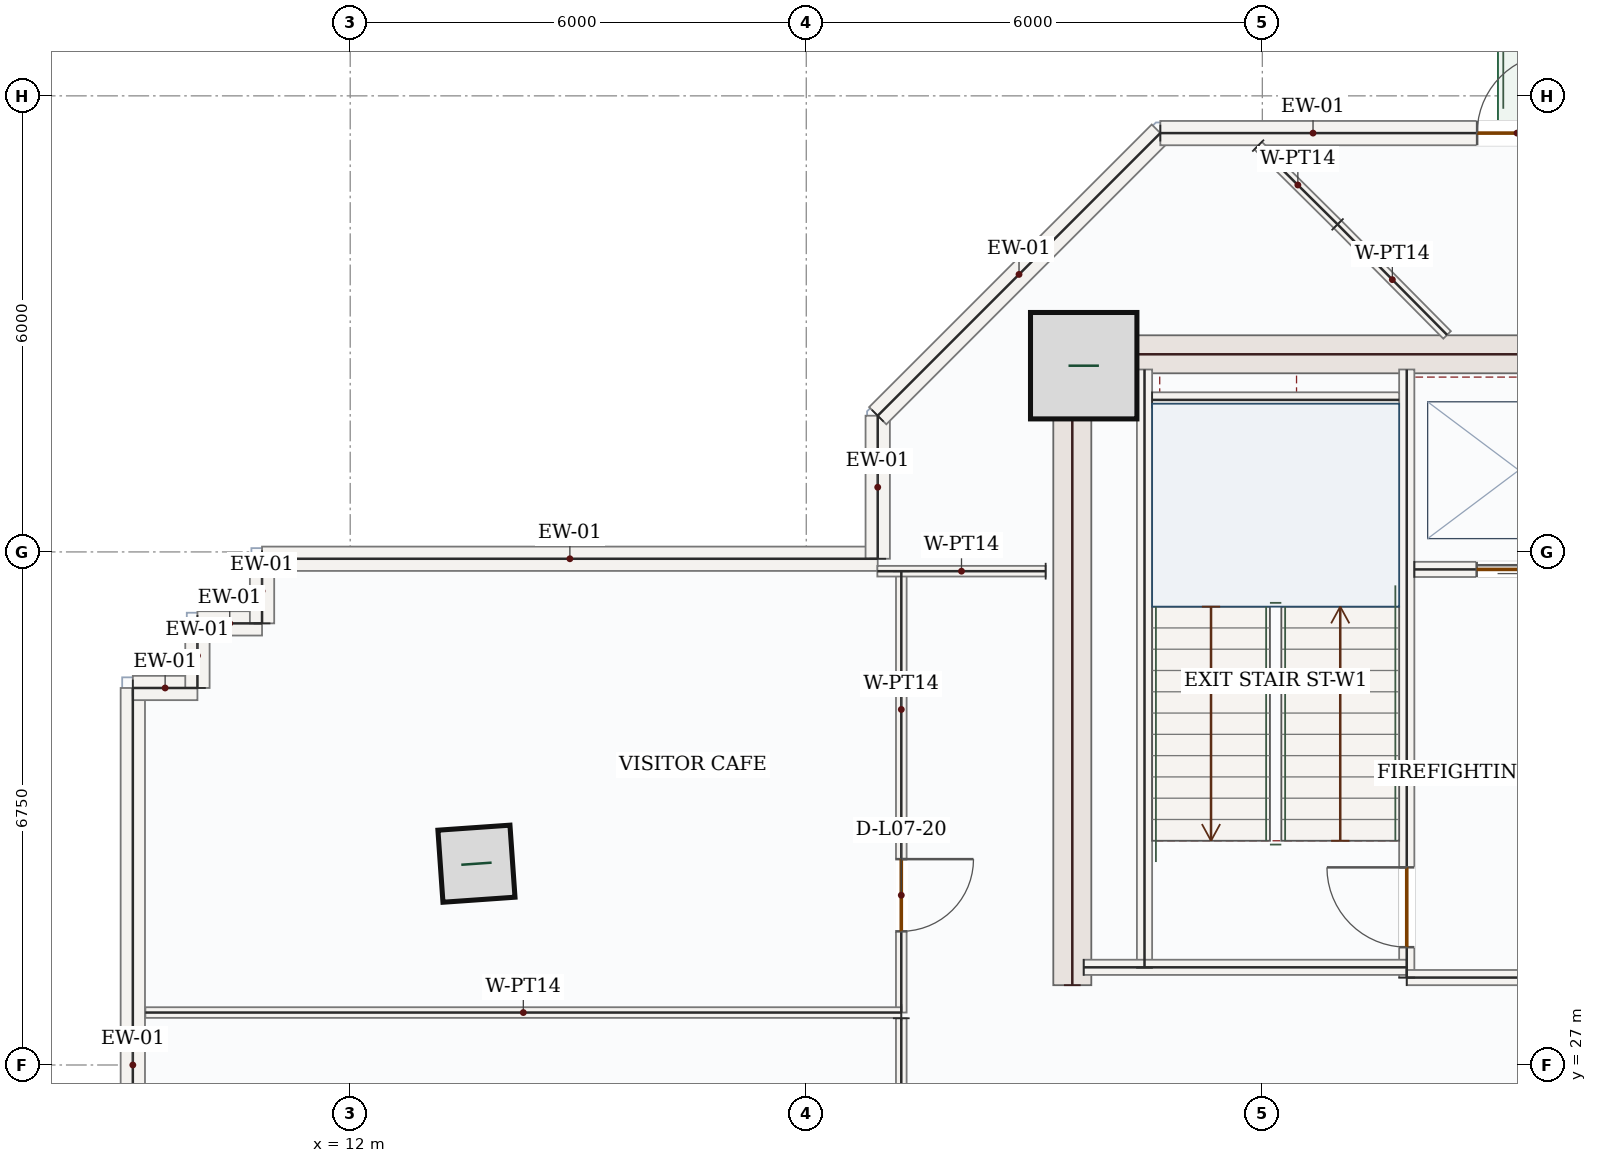
"""IFC4 building model, lengths in metres.
Left out: names, types, materials, properties, quantities, classifications, styles, units other than length and angle.
Written with IfcOpenShell. Run it as: python <this file> out.ifc"""

import sys

from ifc_helpers import new_model, si_unit, direction, frame, frame_2d, origin, origin_2d, place, context, subcontext, project, spatial, rectangle, hollow_rectangle, extrude, source, transform, mapped, element, fill, save


model = new_model("IFC4")
c1 = context("Model", 3, precision=1e-05, world=origin(), true_north=direction((0.0, 1.0)))
c2 = subcontext(c1, "Body", "Model", "MODEL_VIEW")
j1 = project(units=[si_unit("LENGTHUNIT", "METRE"), si_unit("PLANEANGLEUNIT", "RADIAN")], contexts=[c1])
p1 = place(None, origin())
s1 = spatial("IfcSite", under=j1, at=p1, CompositionType="ELEMENT")
p2 = place(p1, origin())
s2 = spatial("IfcBuilding", under=s1, at=p2, CompositionType="ELEMENT")
p3 = place(p2, frame((0.0, 0.0, 37.5)))
s3 = spatial("IfcBuildingStorey", under=s2, at=p3, CompositionType="ELEMENT", Elevation=37.5)
m1 = source(origin(), c2, "Body", "SweptSolid", [
    extrude(rectangle(XDim=8.55, YDim=0.5, at=frame_2d((4.275, 0.0))), origin(), (0.0, 0.0, 1.0), 3.95),
])
p4 = place(p3, frame((21.5, 28.05, 0.0), z_axis=(0.0, 0.0, 1.0), x_axis=(0.0, 1.0, 0.0)))
e1 = element("IfcWall", 1, at=p4, inside=s3, PredefinedType="SHEAR", context=c2, shape_type="MappedRepresentation", body=[
    mapped(m1, transform((0.0, 0.0, 0.0), x_axis=(1.0, 0.0, 0.0), y_axis=(0.0, 1.0, 0.0), z_axis=(0.0, 0.0, 1.0), scale=1.0)),
])
m2 = source(origin(), c2, "Body", "SweptSolid", [
    extrude(rectangle(XDim=7.0, YDim=0.5, at=frame_2d((3.5, 0.0))), origin(), (0.0, 0.0, 1.0), 3.95),
])
p5 = place(p3, frame((21.75, 36.35, 0.0), z_axis=(0.0, 0.0, 1.0), x_axis=(1.0, 0.0, 0.0)))
e2 = element("IfcWall", 2, at=p5, inside=s3, PredefinedType="SHEAR", context=c2, shape_type="MappedRepresentation", body=[
    mapped(m2, transform((0.0, 0.0, 0.0), x_axis=(1.0, 0.0, 0.0), y_axis=(0.0, 1.0, 0.0), z_axis=(0.0, 0.0, 1.0), scale=1.0)),
])
m3 = source(origin(), c2, "Body", "SweptSolid", [
    extrude(rectangle(XDim=1.4, YDim=1.4, at=origin_2d()), origin(), (0.0, 0.0, 1.0), 4.2),
])
p6 = place(p3, frame((21.65, 36.2, 0.0), z_axis=(0.0, 0.0, 1.0), x_axis=(1.0, 0.0, 0.0)))
e3 = element("IfcColumn", 3, at=p6, inside=s3, PredefinedType="COLUMN", context=c2, shape_type="MappedRepresentation", body=[
    mapped(m3, transform((0.0, 0.0, 0.0), x_axis=(1.0, 0.0, 0.0), y_axis=(0.0, 1.0, 0.0), z_axis=(0.0, 0.0, 1.0), scale=1.0)),
])
m4 = source(origin(), c2, "Body", "SweptSolid", [
    extrude(hollow_rectangle(XDim=0.95, YDim=0.95, WallThickness=0.05, at=origin_2d()), origin(), (0.0, 0.0, 1.0), 4.2),
])
p7 = place(p3, frame((13.661, 29.648, 0.0), z_axis=(0.0, 0.0, 1.0), x_axis=(0.99756405026, 0.069756473744, 0.0)))
e4 = element("IfcColumn", 4, at=p7, inside=s3, PredefinedType="COLUMN", context=c2, shape_type="MappedRepresentation", body=[
    mapped(m4, transform((0.0, 0.0, 0.0), x_axis=(1.0, 0.0, 0.0), y_axis=(0.0, 1.0, 0.0), z_axis=(0.0, 0.0, 1.0), scale=1.0)),
])
m5 = source(origin(), c2, "Body", "SweptSolid", [
    extrude(rectangle(XDim=9.92, YDim=0.32, at=frame_2d((4.96, 0.0))), origin(), (0.0, 0.0, 1.0), 3.95),
])
p8 = place(p3, frame((9.14, 22.04, 0.0), z_axis=(0.0, 0.0, 1.0), x_axis=(0.0, 1.0, 0.0)))
e5 = element("IfcWall", 5, at=p8, inside=s3, PredefinedType="SOLIDWALL", context=c2, shape_type="MappedRepresentation", body=[
    mapped(m5, transform((0.0, 0.0, 0.0), x_axis=(1.0, 0.0, 0.0), y_axis=(0.0, 1.0, 0.0), z_axis=(0.0, 0.0, 1.0), scale=1.0)),
])
m6 = source(origin(), c2, "Body", "SweptSolid", [
    extrude(rectangle(XDim=0.85, YDim=0.32, at=frame_2d((0.425, 0.0))), origin(), (0.0, 0.0, 1.0), 3.95),
])
for number, where, z_axis, x_axis in (
    (6, (9.14, 31.96, 0.0), (0.0, 0.0, 1.0), (1.0, 0.0, 0.0)),
    (7, (9.99, 31.96, 0.0), (0.0, 0.0, 1.0), (0.0, 1.0, 0.0)),
    (8, (9.99, 32.81, 0.0), (0.0, 0.0, 1.0), (1.0, 0.0, 0.0)),
):
    element("IfcWall", number, at=place(p3, frame(where, z_axis=z_axis, x_axis=x_axis)), inside=s3, PredefinedType="SOLIDWALL", context=c2, shape_type="MappedRepresentation", body=[
        mapped(m6, transform((0.0, 0.0, 0.0), x_axis=(1.0, 0.0, 0.0), y_axis=(0.0, 1.0, 0.0), z_axis=(0.0, 0.0, 1.0), scale=1.0)),
    ])
m7 = source(origin(), c2, "Body", "SweptSolid", [
    extrude(rectangle(XDim=0.85, YDim=0.32, at=frame_2d((0.425, 0.0))), origin(), (0.0, 0.0, 1.0), 3.95),
])
p9 = place(p3, frame((10.84, 32.81, 0.0), z_axis=(0.0, 0.0, 1.0), x_axis=(0.0, 1.0, 0.0)))
e9 = element("IfcWall", 9, at=p9, inside=s3, PredefinedType="SOLIDWALL", context=c2, shape_type="MappedRepresentation", body=[
    mapped(m7, transform((0.0, 0.0, 0.0), x_axis=(1.0, 0.0, 0.0), y_axis=(0.0, 1.0, 0.0), z_axis=(0.0, 0.0, 1.0), scale=1.0)),
])
m8 = source(origin(), c2, "Body", "SweptSolid", [
    extrude(rectangle(XDim=8.1, YDim=0.32, at=frame_2d((4.05, 0.0))), origin(), (0.0, 0.0, 1.0), 3.95),
])
p10 = place(p3, frame((10.84, 33.66, 0.0), z_axis=(0.0, 0.0, 1.0), x_axis=(1.0, 0.0, 0.0)))
e10 = element("IfcWall", 10, at=p10, inside=s3, PredefinedType="SOLIDWALL", context=c2, shape_type="MappedRepresentation", body=[
    mapped(m8, transform((0.0, 0.0, 0.0), x_axis=(1.0, 0.0, 0.0), y_axis=(0.0, 1.0, 0.0), z_axis=(0.0, 0.0, 1.0), scale=1.0)),
])
m9 = source(origin(), c2, "Body", "SweptSolid", [
    extrude(rectangle(XDim=1.882, YDim=0.32, at=frame_2d((0.941, 0.0))), origin(), (0.0, 0.0, 1.0), 3.95),
])
p11 = place(p3, frame((18.94, 33.66, 0.0), z_axis=(0.0, 0.0, 1.0), x_axis=(0.0, 1.0, 0.0)))
e11 = element("IfcWall", 11, at=p11, inside=s3, PredefinedType="SOLIDWALL", context=c2, shape_type="MappedRepresentation", body=[
    mapped(m9, transform((0.0, 0.0, 0.0), x_axis=(1.0, 0.0, 0.0), y_axis=(0.0, 1.0, 0.0), z_axis=(0.0, 0.0, 1.0), scale=1.0)),
])
m10 = source(origin(), c2, "Body", "SweptSolid", [
    extrude(rectangle(XDim=5.258, YDim=0.32, at=frame_2d((2.629, 0.0))), origin(), (0.0, 0.0, 1.0), 3.95),
])
p12 = place(p3, frame((18.94, 35.542, 0.0), z_axis=(0.0, 0.0, 1.0), x_axis=(0.707106781187, 0.707106781187, 0.0)))
e12 = element("IfcWall", 12, at=p12, inside=s3, PredefinedType="SOLIDWALL", context=c2, shape_type="MappedRepresentation", body=[
    mapped(m10, transform((0.0, 0.0, 0.0), x_axis=(1.0, 0.0, 0.0), y_axis=(0.0, 1.0, 0.0), z_axis=(0.0, 0.0, 1.0), scale=1.0)),
])
p13 = place(p3, frame((22.658, 39.26, 0.0), z_axis=(0.0, 0.0, 1.0), x_axis=(1.0, 0.0, 0.0)))
e13 = element("IfcWall", 13, at=p13, inside=s3, PredefinedType="SOLIDWALL", context=c2, shape_type="SweptSolid", body=[
    extrude(rectangle(XDim=6.682, YDim=0.32, at=frame_2d((3.341, 0.0))), origin(), (0.0, 0.0, 1.0), 3.95),
])
p14 = place(p13, frame((4.168, 0.0, 0.0)))
e14 = element("IfcOpeningElement", 14, at=p14, cuts=e13, PredefinedType="OPENING", context=c2, shape_type="SweptSolid", body=[
    extrude(rectangle(XDim=1.05, YDim=2.15, at=frame_2d((0.525, 1.075))), frame((0.0, 0.17, 0.0), z_axis=(0.0, -1.0, 0.0), x_axis=(1.0, 0.0, 0.0)), (0.0, 0.0, 1.0), 0.34),
])
m11 = source(origin(), c2, "Body", "SweptSolid", [
    extrude(rectangle(XDim=7.87, YDim=0.2, at=frame_2d((3.935, 0.0))), origin(), (0.0, 0.0, 1.0), 3.95),
])
p15 = place(p3, frame((22.45, 28.28, 0.0), z_axis=(0.0, 0.0, 1.0), x_axis=(0.0, 1.0, 0.0)))
e15 = element("IfcWall", 15, at=p15, inside=s3, PredefinedType="SOLIDWALL", context=c2, shape_type="MappedRepresentation", body=[
    mapped(m11, transform((0.0, 0.0, 0.0), x_axis=(1.0, 0.0, 0.0), y_axis=(0.0, 1.0, 0.0), z_axis=(0.0, 0.0, 1.0), scale=1.0)),
])
p16 = place(p3, frame((25.9, 28.15, 0.0), z_axis=(0.0, 0.0, 1.0), x_axis=(0.0, 1.0, 0.0)))
e16 = element("IfcWall", 16, at=p16, inside=s3, PredefinedType="SOLIDWALL", context=c2, shape_type="SweptSolid", body=[
    extrude(rectangle(XDim=8.0, YDim=0.2, at=frame_2d((4.0, 0.0))), origin(), (0.0, 0.0, 1.0), 3.95),
])
p17 = place(p16, frame((0.4, 0.0, 0.0)))
e17 = element("IfcOpeningElement", 17, at=p17, cuts=e16, PredefinedType="OPENING", context=c2, shape_type="SweptSolid", body=[
    extrude(rectangle(XDim=1.05, YDim=2.15, at=frame_2d((0.525, 1.075))), frame((0.0, 0.11, 0.0), z_axis=(0.0, -1.0, 0.0), x_axis=(1.0, 0.0, 0.0)), (0.0, 0.0, 1.0), 0.22),
])
m12 = source(origin(), c2, "Body", "SweptSolid", [
    extrude(rectangle(XDim=4.25, YDim=0.2, at=frame_2d((2.125, 0.0))), origin(), (0.0, 0.0, 1.0), 3.95),
])
p18 = place(p3, frame((21.65, 28.285, 0.0), z_axis=(0.0, 0.0, 1.0), x_axis=(1.0, 0.0, 0.0)))
e18 = element("IfcWall", 18, at=p18, inside=s3, PredefinedType="SOLIDWALL", context=c2, shape_type="MappedRepresentation", body=[
    mapped(m12, transform((0.0, 0.0, 0.0), x_axis=(1.0, 0.0, 0.0), y_axis=(0.0, 1.0, 0.0), z_axis=(0.0, 0.0, 1.0), scale=1.0)),
])
m13 = source(origin(), c2, "Body", "SweptSolid", [
    extrude(rectangle(XDim=3.0, YDim=0.2, at=frame_2d((1.5, 0.0))), origin(), (0.0, 0.0, 1.0), 3.95),
])
p19 = place(p3, frame((25.9, 28.15, 0.0), z_axis=(0.0, 0.0, 1.0), x_axis=(1.0, 0.0, 0.0)))
e19 = element("IfcWall", 19, at=p19, inside=s3, PredefinedType="SOLIDWALL", context=c2, shape_type="MappedRepresentation", body=[
    mapped(m13, transform((0.0, 0.0, 0.0), x_axis=(1.0, 0.0, 0.0), y_axis=(0.0, 1.0, 0.0), z_axis=(0.0, 0.0, 1.0), scale=1.0)),
])
m14 = source(origin(), c2, "Body", "SweptSolid", [
    extrude(rectangle(XDim=3.25, YDim=0.2, at=frame_2d((1.625, 0.0))), origin(), (0.0, 0.0, 1.0), 3.95),
])
p20 = place(p3, frame((22.55, 35.75, 0.0), z_axis=(0.0, 0.0, 1.0), x_axis=(1.0, 0.0, 0.0)))
e20 = element("IfcWall", 20, at=p20, inside=s3, PredefinedType="SOLIDWALL", context=c2, shape_type="MappedRepresentation", body=[
    mapped(m14, transform((0.0, 0.0, 0.0), x_axis=(1.0, 0.0, 0.0), y_axis=(0.0, 1.0, 0.0), z_axis=(0.0, 0.0, 1.0), scale=1.0)),
])
p21 = place(p3, frame((26.0, 33.52, 0.0), z_axis=(0.0, 0.0, 1.0), x_axis=(1.0, 0.0, 0.0)))
e21 = element("IfcWall", 21, at=p21, inside=s3, PredefinedType="SOLIDWALL", context=c2, shape_type="SweptSolid", body=[
    extrude(rectangle(XDim=2.75, YDim=0.2, at=frame_2d((1.375, 0.0))), origin(), (0.0, 0.0, 1.0), 3.95),
])
p22 = place(p21, frame((0.82, 0.0, 0.0)))
e22 = element("IfcOpeningElement", 22, at=p22, cuts=e21, PredefinedType="OPENING", context=c2, shape_type="SweptSolid", body=[
    extrude(rectangle(XDim=1.1, YDim=2.15, at=frame_2d((0.55, 1.075))), frame((0.0, 0.11, 0.0), z_axis=(0.0, -1.0, 0.0), x_axis=(1.0, 0.0, 0.0)), (0.0, 0.0, 1.0), 0.22),
])
p23 = place(p3, frame((19.25, 33.496, 0.0), z_axis=(0.0, 0.0, 1.0), x_axis=(-8.409368e-05, -0.999999996464, 0.0)))
e23 = element("IfcWall", 23, at=p23, inside=s3, PredefinedType="PARTITIONING", context=c2, shape_type="SweptSolid", body=[
    extrude(rectangle(XDim=5.806, YDim=0.14, at=frame_2d((2.903, 0.0))), origin(), (0.0, 0.0, 1.0), 3.95),
])
p24 = place(p23, frame((3.788, 0.0, 0.0)))
e24 = element("IfcOpeningElement", 24, at=p24, cuts=e23, PredefinedType="OPENING", context=c2, shape_type="SweptSolid", body=[
    extrude(rectangle(XDim=0.95, YDim=2.15, at=frame_2d((0.475, 1.075))), frame((0.0, 0.08, 0.0), z_axis=(0.0, -1.0, 0.0), x_axis=(1.0, 0.0, 0.0)), (0.0, 0.0, 1.0), 0.16),
])
m15 = source(origin(), c2, "Body", "SweptSolid", [
    extrude(rectangle(XDim=9.945, YDim=0.14, at=frame_2d((4.973, 0.0))), origin(), (0.0, 0.0, 1.0), 3.95),
])
p25 = place(p3, frame((19.25, 27.69, 0.0), z_axis=(0.0, 0.0, 1.0), x_axis=(-1.0, 0.0, 0.0)))
e25 = element("IfcWall", 25, at=p25, inside=s3, PredefinedType="PARTITIONING", context=c2, shape_type="MappedRepresentation", body=[
    mapped(m15, transform((0.0, 0.0, 0.0), x_axis=(1.0, 0.0, 0.0), y_axis=(0.0, 1.0, 0.0), z_axis=(0.0, 0.0, 1.0), scale=1.0)),
])
m16 = source(origin(), c2, "Body", "SweptSolid", [
    extrude(rectangle(XDim=1.471, YDim=0.14, at=frame_2d((0.736, 0.0))), origin(), (0.0, 0.0, 1.0), 3.95),
])
p26 = place(p3, frame((23.945, 39.095, 0.0), z_axis=(0.0, 0.0, 1.0), x_axis=(0.710417151562, -0.703780840011, 0.0)))
e26 = element("IfcWall", 26, at=p26, inside=s3, PredefinedType="PARTITIONING", context=c2, shape_type="MappedRepresentation", body=[
    mapped(m16, transform((0.0, 0.0, 0.0), x_axis=(1.0, 0.0, 0.0), y_axis=(0.0, 1.0, 0.0), z_axis=(0.0, 0.0, 1.0), scale=1.0)),
])
m17 = source(origin(), c2, "Body", "SweptSolid", [
    extrude(rectangle(XDim=2.047, YDim=0.14, at=frame_2d((1.024, 0.0))), origin(), (0.0, 0.0, 1.0), 3.95),
])
p27 = place(p3, frame((24.99, 38.059, 0.0), z_axis=(0.0, 0.0, 1.0), x_axis=(0.703819772346, -0.710378580797, 0.0)))
e27 = element("IfcWall", 27, at=p27, inside=s3, PredefinedType="PARTITIONING", context=c2, shape_type="MappedRepresentation", body=[
    mapped(m17, transform((0.0, 0.0, 0.0), x_axis=(1.0, 0.0, 0.0), y_axis=(0.0, 1.0, 0.0), z_axis=(0.0, 0.0, 1.0), scale=1.0)),
])
m18 = source(origin(), c2, "Body", "SweptSolid", [
    extrude(rectangle(XDim=2.214, YDim=0.14, at=frame_2d((1.107, 0.0))), origin(), (0.0, 0.0, 1.0), 3.95),
])
p28 = place(p3, frame((21.149, 33.497, 0.0), z_axis=(0.0, 0.0, 1.0), x_axis=(-0.999999993922, -0.000110253583, 0.0)))
e28 = element("IfcWall", 28, at=p28, inside=s3, PredefinedType="PARTITIONING", context=c2, shape_type="MappedRepresentation", body=[
    mapped(m18, transform((0.0, 0.0, 0.0), x_axis=(1.0, 0.0, 0.0), y_axis=(0.0, 1.0, 0.0), z_axis=(0.0, 0.0, 1.0), scale=1.0)),
])
p29 = place(p3, frame((19.25, 27.615, 0.0), z_axis=(0.0, 0.0, 1.0), x_axis=(0.0, -1.0, 0.0)))
e29 = element("IfcWall", 29, at=p29, inside=s3, PredefinedType="PARTITIONING", context=c2, shape_type="SweptSolid", body=[
    extrude(rectangle(XDim=7.109, YDim=0.14, at=frame_2d((3.555, 0.0))), origin(), (0.0, 0.0, 1.0), 3.95),
])
p30 = place(p29, frame((2.156, 0.0, 0.0)))
e30 = element("IfcOpeningElement", 30, at=p30, cuts=e29, PredefinedType="OPENING", context=c2, shape_type="SweptSolid", body=[
    extrude(rectangle(XDim=0.95, YDim=2.15, at=frame_2d((0.475, 1.075))), frame((0.0, 0.08, 0.0), z_axis=(0.0, -1.0, 0.0), x_axis=(1.0, 0.0, 0.0)), (0.0, 0.0, 1.0), 0.16),
])
m19 = source(origin(), c2, "Body", "SweptSolid", [
    extrude(rectangle(XDim=1.05, YDim=2.15, at=frame_2d((0.525, 1.075))), frame((0.0, 0.025, 0.0), z_axis=(0.0, -1.0, 0.0), x_axis=(1.0, 0.0, 0.0)), (0.0, 0.0, 1.0), 0.05),
])
p31 = place(p14, origin())
e31 = element("IfcDoor", 31, at=p31, inside=s3, OperationType="SINGLE_SWING_RIGHT", PredefinedType="DOOR", context=c2, shape_type="MappedRepresentation", body=[
    mapped(m19, transform((0.0, 0.0, 0.0), x_axis=(1.0, 0.0, 0.0), y_axis=(0.0, 1.0, 0.0), z_axis=(0.0, 0.0, 1.0), scale=1.0)),
])
fill(e14, e31)
p32 = place(p17, origin())
e32 = element("IfcDoor", 32, at=p32, inside=s3, OperationType="SINGLE_SWING_RIGHT", PredefinedType="DOOR", context=c2, shape_type="MappedRepresentation", body=[
    mapped(m19, transform((0.0, 0.0, 0.0), x_axis=(1.0, 0.0, 0.0), y_axis=(0.0, 1.0, 0.0), z_axis=(0.0, 0.0, 1.0), scale=1.0)),
])
fill(e17, e32)
m20 = source(origin(), c2, "Body", "SweptSolid", [
    extrude(rectangle(XDim=1.1, YDim=2.15, at=frame_2d((0.55, 1.075))), frame((0.0, 0.025, 0.0), z_axis=(0.0, -1.0, 0.0), x_axis=(1.0, 0.0, 0.0)), (0.0, 0.0, 1.0), 0.05),
])
p33 = place(p22, origin())
e33 = element("IfcDoor", 33, at=p33, inside=s3, OperationType="DOUBLE_DOOR_SLIDING", PredefinedType="DOOR", context=c2, shape_type="MappedRepresentation", body=[
    mapped(m20, transform((0.0, 0.0, 0.0), x_axis=(1.0, 0.0, 0.0), y_axis=(0.0, 1.0, 0.0), z_axis=(0.0, 0.0, 1.0), scale=1.0)),
])
fill(e22, e33)
m21 = source(origin(), c2, "Body", "SweptSolid", [
    extrude(rectangle(XDim=0.95, YDim=2.15, at=frame_2d((0.475, 1.075))), frame((0.0, 0.025, 0.0), z_axis=(0.0, -1.0, 0.0), x_axis=(1.0, 0.0, 0.0)), (0.0, 0.0, 1.0), 0.05),
])
p34 = place(p24, origin())
e34 = element("IfcDoor", 34, at=p34, inside=s3, OperationType="SINGLE_SWING_LEFT", PredefinedType="DOOR", context=c2, shape_type="MappedRepresentation", body=[
    mapped(m21, transform((0.0, 0.0, 0.0), x_axis=(1.0, 0.0, 0.0), y_axis=(0.0, 1.0, 0.0), z_axis=(0.0, 0.0, 1.0), scale=1.0)),
])
fill(e24, e34)
save(model, sys.argv[1])
